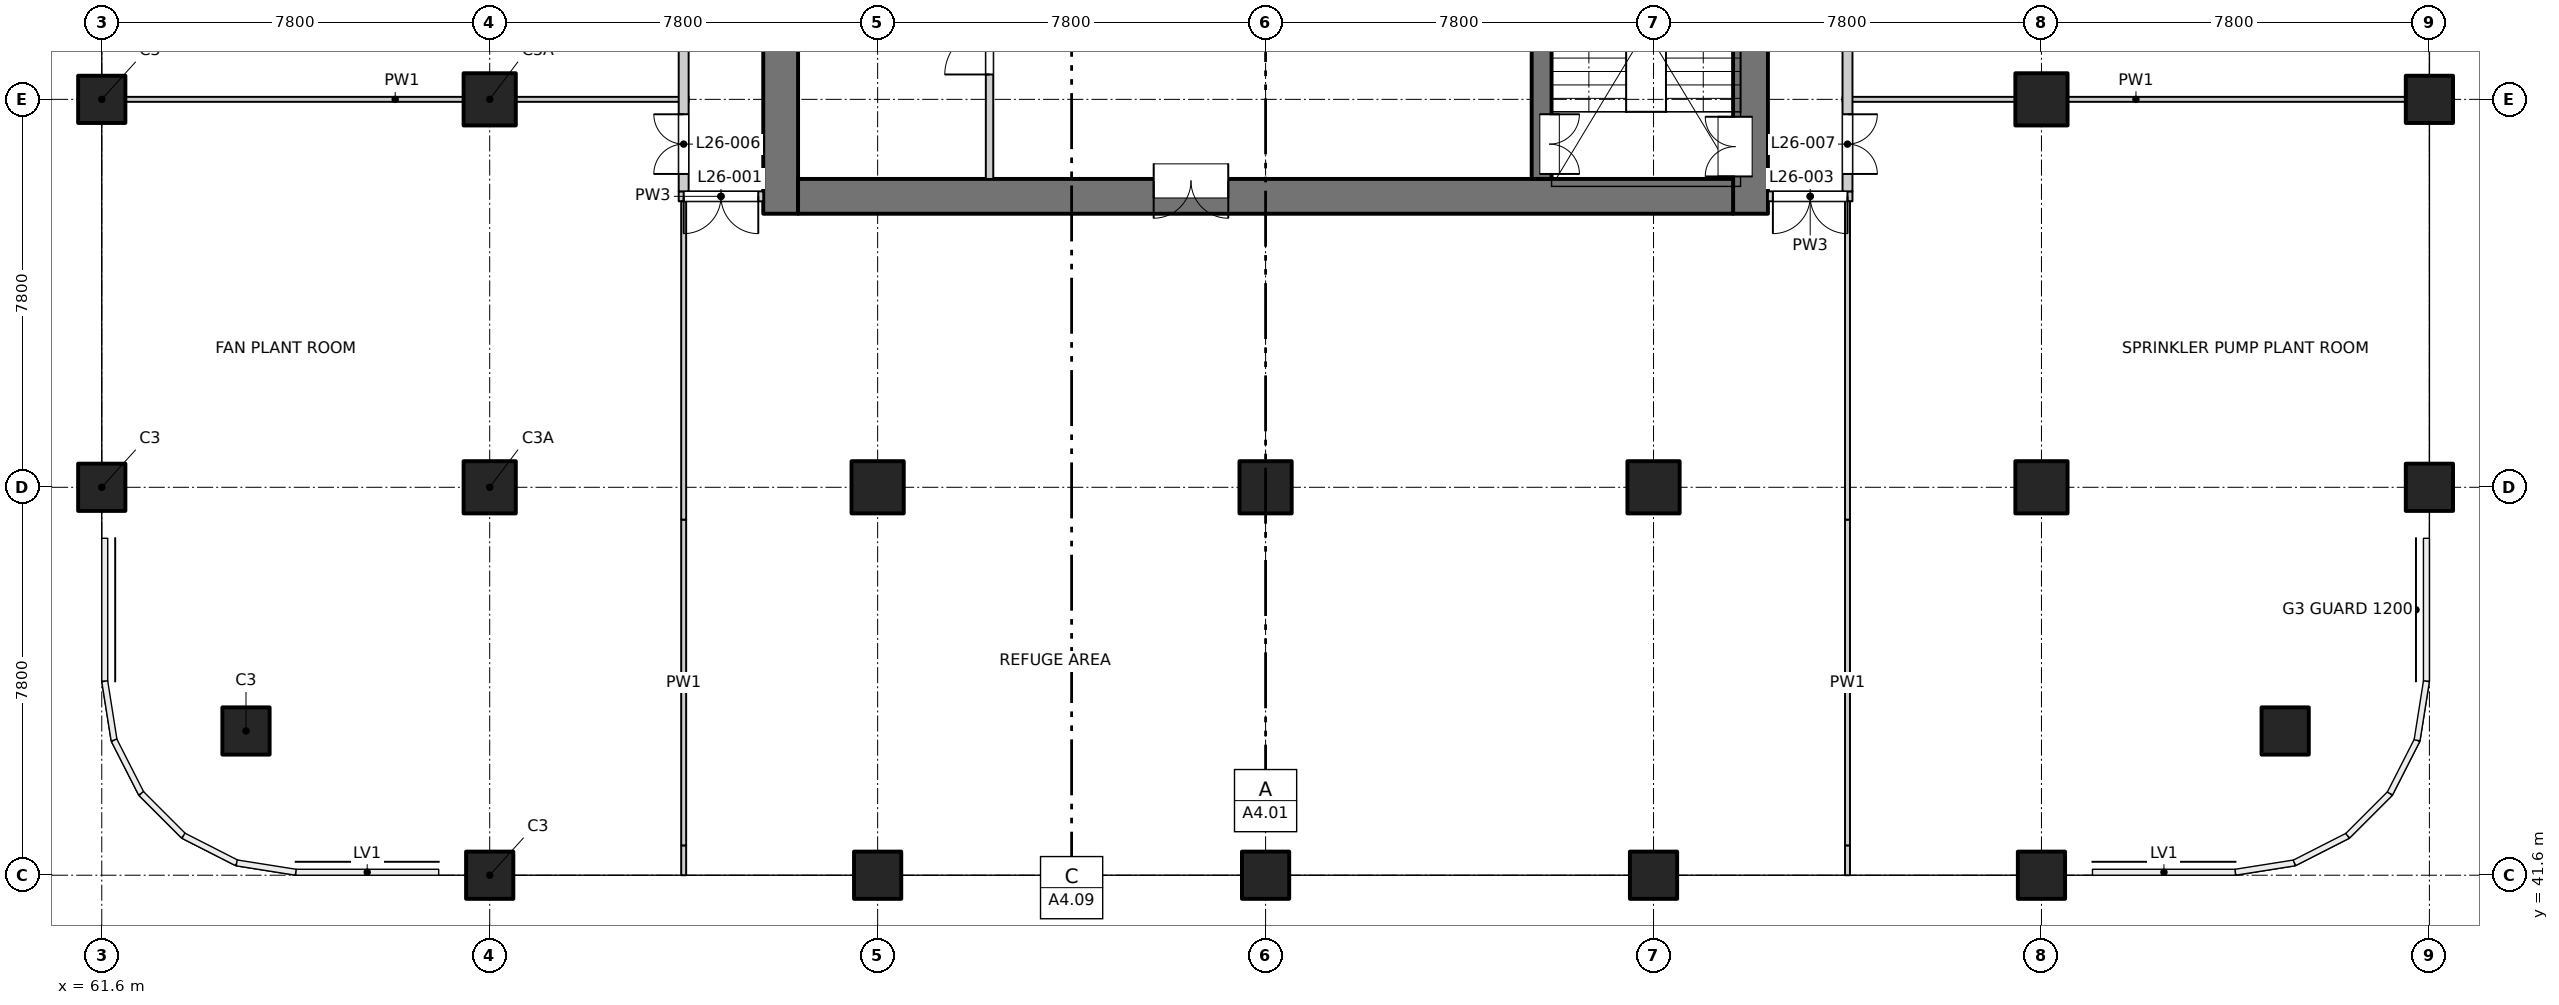
"""IFC4 building model, lengths in metres.
Left out: names, types, materials, properties, quantities, classifications, styles, units other than length and angle.
Written with IfcOpenShell. Run it as: python <this file> out.ifc"""

import sys

from ifc_helpers import new_model, si_unit, direction, frame, frame_2d, origin, origin_2d, place, context, subcontext, project, spatial, rectangle, extrude, element, fill, save


model = new_model("IFC4")
c1 = context("Model", 3, precision=1e-05, world=origin(), true_north=direction((0.0, 1.0)))
c2 = subcontext(c1, "Body", "Model", "MODEL_VIEW")
j1 = project(units=[si_unit("LENGTHUNIT", "METRE"), si_unit("PLANEANGLEUNIT", "RADIAN")], contexts=[c1])
p1 = place(None, origin())
s1 = spatial("IfcSite", under=j1, at=p1, CompositionType="ELEMENT")
p2 = place(p1, origin())
s2 = spatial("IfcBuilding", under=s1, at=p2, CompositionType="ELEMENT")
p3 = place(p2, frame((0.0, 0.0, 95.4)))
s3 = spatial("IfcBuildingStorey", under=s2, at=p3, CompositionType="ELEMENT", Elevation=95.4)
for number, where, z_axis, x_axis in (
    (1, (64.5, 44.5, -0.3), (0.0, 0.0, 1.0), (1.0, 0.0, 0.0)),
    (2, (105.5, 44.5, -0.3), (0.0, 0.0, 1.0), (1.0, 0.0, 0.0)),
    (3, (61.6, 49.4, -0.3), (0.0, 0.0, 1.0), (1.0, 0.0, 0.0)),
    (4, (108.4, 49.4, -0.3), (0.0, 0.0, 1.0), (1.0, 0.0, 0.0)),
    (5, (69.4, 41.6, -0.3), (0.0, 0.0, 1.0), (1.0, 0.0, 0.0)),
    (6, (61.6, 57.2, -0.3), (0.0, 0.0, 1.0), (1.0, 0.0, 0.0)),
    (7, (108.4, 57.2, -0.3), (0.0, 0.0, 1.0), (1.0, 0.0, 0.0)),
    (8, (77.2, 41.6, -0.3), (0.0, 0.0, 1.0), (1.0, 0.0, 0.0)),
    (9, (85.0, 41.6, -0.3), (0.0, 0.0, 1.0), (1.0, 0.0, 0.0)),
    (10, (92.8, 41.6, -0.3), (0.0, 0.0, 1.0), (1.0, 0.0, 0.0)),
    (11, (100.6, 41.6, -0.3), (0.0, 0.0, 1.0), (1.0, 0.0, 0.0)),
):
    element("IfcColumn", number, at=place(p3, frame(where, z_axis=z_axis, x_axis=x_axis)), inside=s3, PredefinedType="COLUMN", context=c2, shape_type="SweptSolid", body=[
        extrude(rectangle(XDim=0.95, YDim=0.95, at=origin_2d()), origin(), (0.0, 0.0, 1.0), 2.9),
    ])
for number, where, z_axis, x_axis in (
    (12, (69.4, 49.4, -0.3), (0.0, 0.0, 1.0), (1.0, 0.0, 0.0)),
    (13, (69.4, 57.2, -0.3), (0.0, 0.0, 1.0), (1.0, 0.0, 0.0)),
    (14, (77.2, 49.4, -0.3), (0.0, 0.0, 1.0), (1.0, 0.0, 0.0)),
    (15, (85.0, 49.4, -0.3), (0.0, 0.0, 1.0), (1.0, 0.0, 0.0)),
    (16, (92.8, 49.4, -0.3), (0.0, 0.0, 1.0), (1.0, 0.0, 0.0)),
    (17, (100.6, 49.4, -0.3), (0.0, 0.0, 1.0), (1.0, 0.0, 0.0)),
    (18, (100.6, 57.2, -0.3), (0.0, 0.0, 1.0), (1.0, 0.0, 0.0)),
):
    element("IfcColumn", number, at=place(p3, frame(where, z_axis=z_axis, x_axis=x_axis)), inside=s3, PredefinedType="COLUMN", context=c2, shape_type="SweptSolid", body=[
        extrude(rectangle(XDim=1.05, YDim=1.05, at=origin_2d()), origin(), (0.0, 0.0, 1.0), 2.9),
    ])
p4 = place(p3, frame((75.25, 54.9, -0.3), z_axis=(0.0, 0.0, 1.0), x_axis=(0.0, 1.0, 0.0)))
e19 = element("IfcWall", 19, at=p4, inside=s3, PredefinedType="SOLIDWALL", context=c2, shape_type="SweptSolid", body=[
    extrude(rectangle(XDim=22.4, YDim=0.7, at=frame_2d((11.2, 0.0))), origin(), (0.0, 0.0, 1.0), 4.5),
])
p5 = place(p4, frame((7.55, 0.0, 0.3)))
e20 = element("IfcOpeningElement", 20, at=p5, cuts=e19, PredefinedType="OPENING", context=c2, shape_type="SweptSolid", body=[
    extrude(rectangle(XDim=0.9, YDim=2.1, at=frame_2d((0.45, 1.05))), frame((0.0, 0.36, 0.0), z_axis=(0.0, -1.0, 0.0), x_axis=(1.0, 0.0, 0.0)), (0.0, 0.0, 1.0), 0.72),
])
p6 = place(p4, frame((10.85, 0.0, 0.3)))
e21 = element("IfcOpeningElement", 21, at=p6, cuts=e19, PredefinedType="OPENING", context=c2, shape_type="SweptSolid", body=[
    extrude(rectangle(XDim=0.9, YDim=2.1, at=frame_2d((0.45, 1.05))), frame((0.0, 0.36, 0.0), z_axis=(0.0, -1.0, 0.0), x_axis=(1.0, 0.0, 0.0)), (0.0, 0.0, 1.0), 0.72),
])
p7 = place(p4, frame((15.35, 0.0, 0.3)))
e22 = element("IfcOpeningElement", 22, at=p7, cuts=e19, PredefinedType="OPENING", context=c2, shape_type="SweptSolid", body=[
    extrude(rectangle(XDim=0.9, YDim=2.1, at=frame_2d((0.45, 1.05))), frame((0.0, 0.36, 0.0), z_axis=(0.0, -1.0, 0.0), x_axis=(1.0, 0.0, 0.0)), (0.0, 0.0, 1.0), 0.72),
])
p8 = place(p4, frame((20.15, 0.0, 0.3)))
e23 = element("IfcOpeningElement", 23, at=p8, cuts=e19, PredefinedType="OPENING", context=c2, shape_type="SweptSolid", body=[
    extrude(rectangle(XDim=0.9, YDim=2.1, at=frame_2d((0.45, 1.05))), frame((0.0, 0.36, 0.0), z_axis=(0.0, -1.0, 0.0), x_axis=(1.0, 0.0, 0.0)), (0.0, 0.0, 1.0), 0.72),
])
p9 = place(p3, frame((94.75, 54.9, -0.3), z_axis=(0.0, 0.0, 1.0), x_axis=(0.0, 1.0, 0.0)))
e24 = element("IfcWall", 24, at=p9, inside=s3, PredefinedType="SOLIDWALL", context=c2, shape_type="SweptSolid", body=[
    extrude(rectangle(XDim=7.05, YDim=0.7, at=frame_2d((3.525, 0.0))), origin(), (0.0, 0.0, 1.0), 4.5),
])
p10 = place(p9, frame((0.75, 0.0, 0.3)))
e25 = element("IfcOpeningElement", 25, at=p10, cuts=e24, PredefinedType="OPENING", context=c2, shape_type="SweptSolid", body=[
    extrude(rectangle(XDim=1.2, YDim=2.1, at=frame_2d((0.6, 1.05))), frame((0.0, 0.36, 0.0), z_axis=(0.0, -1.0, 0.0), x_axis=(1.0, 0.0, 0.0)), (0.0, 0.0, 1.0), 0.72),
])
p11 = place(p3, frame((75.6, 55.25, -0.3), z_axis=(0.0, 0.0, 1.0), x_axis=(1.0, 0.0, 0.0)))
e26 = element("IfcWall", 26, at=p11, inside=s3, PredefinedType="SOLIDWALL", context=c2, shape_type="SweptSolid", body=[
    extrude(rectangle(XDim=18.8, YDim=0.7, at=frame_2d((9.4, 0.0))), origin(), (0.0, 0.0, 1.0), 4.5),
])
p12 = place(p11, frame((7.15, 0.0, 0.3)))
e27 = element("IfcOpeningElement", 27, at=p12, cuts=e26, PredefinedType="OPENING", context=c2, shape_type="SweptSolid", body=[
    extrude(rectangle(XDim=1.5, YDim=2.1, at=frame_2d((0.75, 1.05))), frame((0.0, 0.36, 0.0), z_axis=(0.0, -1.0, 0.0), x_axis=(1.0, 0.0, 0.0)), (0.0, 0.0, 1.0), 0.72),
])
p13 = place(p3, frame((90.55, 55.6, -0.3), z_axis=(0.0, 0.0, 1.0), x_axis=(0.0, 1.0, 0.0)))
e28 = element("IfcWall", 28, at=p13, inside=s3, PredefinedType="SOLIDWALL", context=c2, shape_type="SweptSolid", body=[
    extrude(rectangle(XDim=6.35, YDim=0.4, at=frame_2d((3.175, 0.0))), origin(), (0.0, 0.0, 1.0), 4.5),
])
p14 = place(p13, frame((0.1, 0.0, 0.3)))
e29 = element("IfcOpeningElement", 29, at=p14, cuts=e28, PredefinedType="OPENING", context=c2, shape_type="SweptSolid", body=[
    extrude(rectangle(XDim=1.2, YDim=2.1, at=frame_2d((0.6, 1.05))), frame((0.0, 0.21, 0.0), z_axis=(0.0, -1.0, 0.0), x_axis=(1.0, 0.0, 0.0)), (0.0, 0.0, 1.0), 0.42),
])
p15 = place(p3, frame((73.2, 55.25, 0.0), z_axis=(0.0, 0.0, 1.0), x_axis=(1.0, 0.0, 0.0)))
e30 = element("IfcWall", 30, at=p15, inside=s3, PredefinedType="PARTITIONING", context=c2, shape_type="SweptSolid", body=[
    extrude(rectangle(XDim=1.7, YDim=0.2, at=frame_2d((0.85, 0.0))), origin(), (0.0, 0.0, 1.0), 4.2),
])
p16 = place(p15, frame((0.1, 0.0, 0.0)))
e31 = element("IfcOpeningElement", 31, at=p16, cuts=e30, PredefinedType="OPENING", context=c2, shape_type="SweptSolid", body=[
    extrude(rectangle(XDim=1.5, YDim=2.1, at=frame_2d((0.75, 1.05))), frame((0.0, 0.11, 0.0), z_axis=(0.0, -1.0, 0.0), x_axis=(1.0, 0.0, 0.0)), (0.0, 0.0, 1.0), 0.22),
])
p17 = place(p3, frame((95.1, 55.25, 0.0), z_axis=(0.0, 0.0, 1.0), x_axis=(1.0, 0.0, 0.0)))
e32 = element("IfcWall", 32, at=p17, inside=s3, PredefinedType="PARTITIONING", context=c2, shape_type="SweptSolid", body=[
    extrude(rectangle(XDim=1.7, YDim=0.2, at=frame_2d((0.85, 0.0))), origin(), (0.0, 0.0, 1.0), 4.2),
])
p18 = place(p17, frame((0.1, 0.0, 0.0)))
e33 = element("IfcOpeningElement", 33, at=p18, cuts=e32, PredefinedType="OPENING", context=c2, shape_type="SweptSolid", body=[
    extrude(rectangle(XDim=1.5, YDim=2.1, at=frame_2d((0.75, 1.05))), frame((0.0, 0.11, 0.0), z_axis=(0.0, -1.0, 0.0), x_axis=(1.0, 0.0, 0.0)), (0.0, 0.0, 1.0), 0.22),
])
for number, where, z_axis, x_axis in (
    (34, (61.6, 57.2, 0.0), (0.0, 0.0, 1.0), (1.0, 0.0, 0.0)),
    (35, (96.6, 57.2, 0.0), (0.0, 0.0, 1.0), (1.0, 0.0, 0.0)),
):
    element("IfcWall", number, at=place(p3, frame(where, z_axis=z_axis, x_axis=x_axis)), inside=s3, PredefinedType="PARTITIONING", context=c2, shape_type="SweptSolid", body=[
        extrude(rectangle(XDim=11.8, YDim=0.1, at=frame_2d((5.9, 0.0))), origin(), (0.0, 0.0, 1.0), 4.2),
    ])
p19 = place(p3, frame((73.3, 41.6, 0.0), z_axis=(0.0, 0.0, 1.0), x_axis=(0.0, 1.0, 0.0)))
e36 = element("IfcWall", 36, at=p19, inside=s3, PredefinedType="PARTITIONING", context=c2, shape_type="SweptSolid", body=[
    extrude(rectangle(XDim=0.6, YDim=0.1, at=frame_2d((0.3, 0.0))), origin(), (0.0, 0.0, 1.0), 4.2),
])
p20 = place(p3, frame((73.3, 42.2, 0.0), z_axis=(0.0, 0.0, 1.0), x_axis=(0.0, 1.0, 0.0)))
e37 = element("IfcWall", 37, at=p20, inside=s3, PredefinedType="PARTITIONING", context=c2, shape_type="SweptSolid", body=[
    extrude(rectangle(XDim=6.55, YDim=0.1, at=frame_2d((3.275, 0.0))), origin(), (0.0, 0.0, 1.0), 2.6),
])
p21 = place(p3, frame((73.3, 48.75, 0.0), z_axis=(0.0, 0.0, 1.0), x_axis=(0.0, 1.0, 0.0)))
e38 = element("IfcWall", 38, at=p21, inside=s3, PredefinedType="PARTITIONING", context=c2, shape_type="SweptSolid", body=[
    extrude(rectangle(XDim=6.4, YDim=0.1, at=frame_2d((3.2, 0.0))), origin(), (0.0, 0.0, 1.0), 4.2),
])
p22 = place(p3, frame((73.3, 55.35, 0.0), z_axis=(0.0, 0.0, 1.0), x_axis=(0.0, 1.0, 0.0)))
e39 = element("IfcWall", 39, at=p22, inside=s3, PredefinedType="PARTITIONING", context=c2, shape_type="SweptSolid", body=[
    extrude(rectangle(XDim=25.9, YDim=0.2, at=frame_2d((12.95, 0.0))), origin(), (0.0, 0.0, 1.0), 4.2),
])
p23 = place(p22, frame((0.35, 0.0, 0.0)))
e40 = element("IfcOpeningElement", 40, at=p23, cuts=e39, PredefinedType="OPENING", context=c2, shape_type="SweptSolid", body=[
    extrude(rectangle(XDim=1.2, YDim=2.1, at=frame_2d((0.6, 1.05))), frame((0.0, 0.11, 0.0), z_axis=(0.0, -1.0, 0.0), x_axis=(1.0, 0.0, 0.0)), (0.0, 0.0, 1.0), 0.22),
])
p24 = place(p22, frame((3.2, 0.0, 0.0)))
e41 = element("IfcOpeningElement", 41, at=p24, cuts=e39, PredefinedType="OPENING", context=c2, shape_type="SweptSolid", body=[
    extrude(rectangle(XDim=1.2, YDim=2.1, at=frame_2d((0.6, 1.05))), frame((0.0, 0.11, 0.0), z_axis=(0.0, -1.0, 0.0), x_axis=(1.0, 0.0, 0.0)), (0.0, 0.0, 1.0), 0.22),
])
p25 = place(p22, frame((22.7, 0.0, 0.0)))
e42 = element("IfcOpeningElement", 42, at=p25, cuts=e39, PredefinedType="OPENING", context=c2, shape_type="SweptSolid", body=[
    extrude(rectangle(XDim=1.2, YDim=2.1, at=frame_2d((0.6, 1.05))), frame((0.0, 0.11, 0.0), z_axis=(0.0, -1.0, 0.0), x_axis=(1.0, 0.0, 0.0)), (0.0, 0.0, 1.0), 0.22),
])
p26 = place(p3, frame((79.45, 55.6, 0.0), z_axis=(0.0, 0.0, 1.0), x_axis=(0.0, 1.0, 0.0)))
e43 = element("IfcWall", 43, at=p26, inside=s3, PredefinedType="PARTITIONING", context=c2, shape_type="SweptSolid", body=[
    extrude(rectangle(XDim=5.3, YDim=0.15, at=frame_2d((2.65, 0.0))), origin(), (0.0, 0.0, 1.0), 4.2),
])
p27 = place(p26, frame((2.1, 0.0, 0.0)))
e44 = element("IfcOpeningElement", 44, at=p27, cuts=e43, PredefinedType="OPENING", context=c2, shape_type="SweptSolid", body=[
    extrude(rectangle(XDim=0.9, YDim=2.1, at=frame_2d((0.45, 1.05))), frame((0.0, 0.085, 0.0), z_axis=(0.0, -1.0, 0.0), x_axis=(1.0, 0.0, 0.0)), (0.0, 0.0, 1.0), 0.17),
])
p28 = place(p3, frame((96.7, 41.6, 0.0), z_axis=(0.0, 0.0, 1.0), x_axis=(0.0, 1.0, 0.0)))
e45 = element("IfcWall", 45, at=p28, inside=s3, PredefinedType="PARTITIONING", context=c2, shape_type="SweptSolid", body=[
    extrude(rectangle(XDim=0.6, YDim=0.1, at=frame_2d((0.3, 0.0))), origin(), (0.0, 0.0, 1.0), 4.2),
])
p29 = place(p3, frame((96.7, 42.2, 0.0), z_axis=(0.0, 0.0, 1.0), x_axis=(0.0, 1.0, 0.0)))
e46 = element("IfcWall", 46, at=p29, inside=s3, PredefinedType="PARTITIONING", context=c2, shape_type="SweptSolid", body=[
    extrude(rectangle(XDim=6.55, YDim=0.1, at=frame_2d((3.275, 0.0))), origin(), (0.0, 0.0, 1.0), 2.6),
])
p30 = place(p3, frame((96.7, 48.75, 0.0), z_axis=(0.0, 0.0, 1.0), x_axis=(0.0, 1.0, 0.0)))
e47 = element("IfcWall", 47, at=p30, inside=s3, PredefinedType="PARTITIONING", context=c2, shape_type="SweptSolid", body=[
    extrude(rectangle(XDim=6.4, YDim=0.1, at=frame_2d((3.2, 0.0))), origin(), (0.0, 0.0, 1.0), 4.2),
])
p31 = place(p3, frame((96.7, 55.35, 0.0), z_axis=(0.0, 0.0, 1.0), x_axis=(0.0, 1.0, 0.0)))
e48 = element("IfcWall", 48, at=p31, inside=s3, PredefinedType="PARTITIONING", context=c2, shape_type="SweptSolid", body=[
    extrude(rectangle(XDim=25.9, YDim=0.2, at=frame_2d((12.95, 0.0))), origin(), (0.0, 0.0, 1.0), 4.2),
])
p32 = place(p31, frame((0.35, 0.0, 0.0)))
e49 = element("IfcOpeningElement", 49, at=p32, cuts=e48, PredefinedType="OPENING", context=c2, shape_type="SweptSolid", body=[
    extrude(rectangle(XDim=1.2, YDim=2.1, at=frame_2d((0.6, 1.05))), frame((0.0, 0.11, 0.0), z_axis=(0.0, -1.0, 0.0), x_axis=(1.0, 0.0, 0.0)), (0.0, 0.0, 1.0), 0.22),
])
p33 = place(p31, frame((7.1, 0.0, 0.0)))
e50 = element("IfcOpeningElement", 50, at=p33, cuts=e48, PredefinedType="OPENING", context=c2, shape_type="SweptSolid", body=[
    extrude(rectangle(XDim=1.2, YDim=2.1, at=frame_2d((0.6, 1.05))), frame((0.0, 0.11, 0.0), z_axis=(0.0, -1.0, 0.0), x_axis=(1.0, 0.0, 0.0)), (0.0, 0.0, 1.0), 0.22),
])
p34 = place(p31, frame((11.0, 0.0, 0.0)))
e51 = element("IfcOpeningElement", 51, at=p34, cuts=e48, PredefinedType="OPENING", context=c2, shape_type="SweptSolid", body=[
    extrude(rectangle(XDim=1.2, YDim=2.1, at=frame_2d((0.6, 1.05))), frame((0.0, 0.11, 0.0), z_axis=(0.0, -1.0, 0.0), x_axis=(1.0, 0.0, 0.0)), (0.0, 0.0, 1.0), 0.22),
])
p35 = place(p16, origin())
e52 = element("IfcDoor", 52, at=p35, inside=s3, OperationType="DOUBLE_DOOR_SINGLE_SWING", PredefinedType="DOOR", context=c2, shape_type="SweptSolid", body=[
    extrude(rectangle(XDim=1.5, YDim=2.1, at=frame_2d((0.75, 1.05))), frame((0.0, 0.025, 0.0), z_axis=(0.0, -1.0, 0.0), x_axis=(1.0, 0.0, 0.0)), (0.0, 0.0, 1.0), 0.05),
])
fill(e31, e52)
p36 = place(p12, origin())
e53 = element("IfcDoor", 53, at=p36, inside=s3, OperationType="DOUBLE_DOOR_SINGLE_SWING", PredefinedType="DOOR", context=c2, shape_type="SweptSolid", body=[
    extrude(rectangle(XDim=1.5, YDim=2.1, at=frame_2d((0.75, 1.05))), frame((0.0, 0.335, 0.0), z_axis=(0.0, -1.0, 0.0), x_axis=(1.0, 0.0, 0.0)), (0.0, 0.0, 1.0), 0.05),
])
fill(e27, e53)
p37 = place(p18, origin())
e54 = element("IfcDoor", 54, at=p37, inside=s3, OperationType="DOUBLE_DOOR_SINGLE_SWING", PredefinedType="DOOR", context=c2, shape_type="SweptSolid", body=[
    extrude(rectangle(XDim=1.5, YDim=2.1, at=frame_2d((0.75, 1.05))), frame((0.0, 0.025, 0.0), z_axis=(0.0, -1.0, 0.0), x_axis=(1.0, 0.0, 0.0)), (0.0, 0.0, 1.0), 0.05),
])
fill(e33, e54)
p38 = place(p14, origin())
e55 = element("IfcDoor", 55, at=p38, inside=s3, OperationType="DOUBLE_DOOR_SINGLE_SWING", PredefinedType="DOOR", context=c2, shape_type="SweptSolid", body=[
    extrude(rectangle(XDim=1.2, YDim=2.1, at=frame_2d((0.6, 1.05))), frame((0.0, -0.135, 0.0), z_axis=(0.0, -1.0, 0.0), x_axis=(1.0, 0.0, 0.0)), (0.0, 0.0, 1.0), 0.05),
])
fill(e29, e55)
p39 = place(p10, origin())
e56 = element("IfcDoor", 56, at=p39, inside=s3, OperationType="DOUBLE_DOOR_SINGLE_SWING", PredefinedType="DOOR", context=c2, shape_type="SweptSolid", body=[
    extrude(rectangle(XDim=1.2, YDim=2.1, at=frame_2d((0.6, 1.05))), frame((0.0, 0.335, 0.0), z_axis=(0.0, -1.0, 0.0), x_axis=(1.0, 0.0, 0.0)), (0.0, 0.0, 1.0), 0.05),
])
fill(e25, e56)
p40 = place(p23, origin())
e57 = element("IfcDoor", 57, at=p40, inside=s3, OperationType="DOUBLE_DOOR_SINGLE_SWING", PredefinedType="DOOR", context=c2, shape_type="SweptSolid", body=[
    extrude(rectangle(XDim=1.2, YDim=2.1, at=frame_2d((0.6, 1.05))), frame((0.0, 0.025, 0.0), z_axis=(0.0, -1.0, 0.0), x_axis=(1.0, 0.0, 0.0)), (0.0, 0.0, 1.0), 0.05),
])
fill(e40, e57)
p41 = place(p32, origin())
e58 = element("IfcDoor", 58, at=p41, inside=s3, OperationType="DOUBLE_DOOR_SINGLE_SWING", PredefinedType="DOOR", context=c2, shape_type="SweptSolid", body=[
    extrude(rectangle(XDim=1.2, YDim=2.1, at=frame_2d((0.6, 1.05))), frame((0.0, 0.025, 0.0), z_axis=(0.0, -1.0, 0.0), x_axis=(1.0, 0.0, 0.0)), (0.0, 0.0, 1.0), 0.05),
])
fill(e49, e58)
p42 = place(p27, origin())
e59 = element("IfcDoor", 59, at=p42, inside=s3, OperationType="SINGLE_SWING_LEFT", PredefinedType="DOOR", context=c2, shape_type="SweptSolid", body=[
    extrude(rectangle(XDim=0.9, YDim=2.1, at=frame_2d((0.45, 1.05))), frame((0.0, 0.025, 0.0), z_axis=(0.0, -1.0, 0.0), x_axis=(1.0, 0.0, 0.0)), (0.0, 0.0, 1.0), 0.05),
])
fill(e44, e59)
save(model, sys.argv[1])
